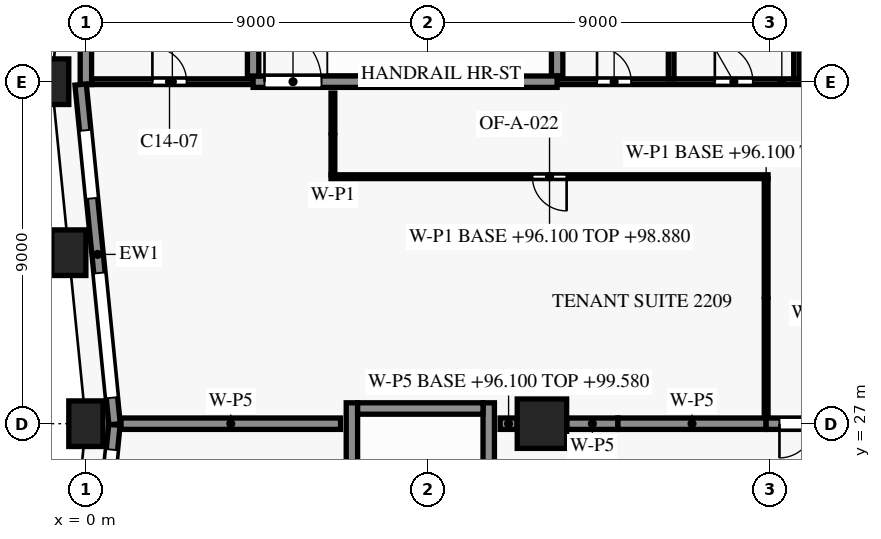
"""IFC4 building model, lengths in metres.
Left out: names, types, materials, properties, quantities, classifications, styles, units other than length and angle.
Written with IfcOpenShell. Run it as: python <this file> out.ifc"""

import sys

from ifc_helpers import new_model, si_unit, direction, frame, frame_2d, origin, origin_2d, place, context, subcontext, project, spatial, rectangle, extrude, element, fill, save


model = new_model("IFC4")
c1 = context("Model", 3, precision=1e-05, world=origin(), true_north=direction((0.0, 1.0)))
c2 = subcontext(c1, "Body", "Model", "MODEL_VIEW")
j1 = project(units=[si_unit("LENGTHUNIT", "METRE"), si_unit("PLANEANGLEUNIT", "RADIAN")], contexts=[c1])
p1 = place(None, origin())
s1 = spatial("IfcSite", under=j1, at=p1, CompositionType="ELEMENT")
p2 = place(p1, origin())
s2 = spatial("IfcBuilding", under=s1, at=p2, CompositionType="ELEMENT")
p3 = place(p2, frame((0.0, 0.0, 96.1)))
s3 = spatial("IfcBuildingStorey", under=s2, at=p3, CompositionType="ELEMENT", Elevation=96.1)
for number, where, z_axis, x_axis in (
    (1, (-0.9, 36.0, 0.0), (0.0, 0.0, 1.0), (0.0, -1.0, 0.0)),
    (2, (-0.45, 31.5, 0.0), (0.0, 0.0, 1.0), (0.1, -0.995, 0.0)),
    (3, (0.0, 27.0, 0.0), (0.0, 0.0, 1.0), (0.0, -1.0, 0.0)),
):
    element("IfcColumn", number, at=place(p3, frame(where, z_axis=z_axis, x_axis=x_axis)), inside=s3, PredefinedType="COLUMN", context=c2, shape_type="SweptSolid", body=[
        extrude(rectangle(XDim=0.9, YDim=1.2, at=origin_2d()), origin(), (0.0, 0.0, 1.0), 3.8),
    ])
p4 = place(p3, frame((12.0, 27.0, 0.0), z_axis=(0.0, 0.0, 1.0), x_axis=(1.0, 0.0, 0.0)))
e4 = element("IfcColumn", 4, at=p4, inside=s3, PredefinedType="COLUMN", context=c2, shape_type="SweptSolid", body=[
    extrude(rectangle(XDim=1.3, YDim=1.3, at=origin_2d()), origin(), (0.0, 0.0, 1.0), 3.8),
])
p5 = place(p3, frame((0.755, 26.985, 0.0), z_axis=(0.0, 0.0, 1.0), x_axis=(-0.099479505633, 0.995039611251, 0.0)))
e5 = element("IfcWall", 5, at=p5, inside=s3, PredefinedType="SOLIDWALL", context=c2, shape_type="SweptSolid", body=[
    extrude(rectangle(XDim=8.985, YDim=0.3, at=frame_2d((4.492, 0.0))), origin(), (0.0, 0.0, 1.0), 3.15),
])
p6 = place(p5, frame((0.701, 0.0, 0.15)))
e6 = element("IfcOpeningElement", 6, at=p6, cuts=e5, PredefinedType="OPENING", context=c2, shape_type="SweptSolid", body=[
    extrude(rectangle(XDim=3.3, YDim=2.4, at=frame_2d((1.65, 1.2))), frame((0.0, 0.16, 0.0), z_axis=(0.0, -1.0, 0.0), x_axis=(1.0, 0.0, 0.0)), (0.0, 0.0, 1.0), 0.32),
])
p7 = place(p5, frame((5.974, 0.0, 0.75)))
e7 = element("IfcOpeningElement", 7, at=p7, cuts=e5, PredefinedType="OPENING", context=c2, shape_type="SweptSolid", body=[
    extrude(rectangle(XDim=1.8, YDim=1.8, at=frame_2d((0.9, 0.9))), frame((0.0, 0.16, 0.0), z_axis=(0.0, -1.0, 0.0), x_axis=(1.0, 0.0, 0.0)), (0.0, 0.0, 1.0), 0.32),
])
p8 = place(p3, frame((-0.148, 17.985, 0.0), z_axis=(0.0, 0.0, 1.0), x_axis=(0.099495688264, 0.995037993253, 0.0)))
e8 = element("IfcWall", 8, at=p8, inside=s3, PredefinedType="SOLIDWALL", context=c2, shape_type="SweptSolid", body=[
    extrude(rectangle(XDim=9.03, YDim=0.3, at=frame_2d((4.515, 0.0))), origin(), (0.0, 0.0, 1.0), 3.15),
])
p9 = place(p8, frame((1.301, 0.0, 0.75)))
e9 = element("IfcOpeningElement", 9, at=p9, cuts=e8, PredefinedType="OPENING", context=c2, shape_type="SweptSolid", body=[
    extrude(rectangle(XDim=1.8, YDim=1.8, at=frame_2d((0.9, 0.9))), frame((0.0, 0.16, 0.0), z_axis=(0.0, -1.0, 0.0), x_axis=(1.0, 0.0, 0.0)), (0.0, 0.0, 1.0), 0.32),
])
p10 = place(p8, frame((5.073, 0.0, 0.15)))
e10 = element("IfcOpeningElement", 10, at=p10, cuts=e8, PredefinedType="OPENING", context=c2, shape_type="SweptSolid", body=[
    extrude(rectangle(XDim=3.3, YDim=2.4, at=frame_2d((1.65, 1.2))), frame((0.0, 0.16, 0.0), z_axis=(0.0, -1.0, 0.0), x_axis=(1.0, 0.0, 0.0)), (0.0, 0.0, 1.0), 0.32),
])
p11 = place(p3, frame((7.15, 27.4, 0.0), z_axis=(0.0, 0.0, 1.0), x_axis=(1.0, 0.0, 0.0)))
e11 = element("IfcWall", 11, at=p11, inside=s3, PredefinedType="SHEAR", context=c2, shape_type="SweptSolid", body=[
    extrude(rectangle(XDim=3.3, YDim=0.3, at=frame_2d((1.65, 0.0))), origin(), (0.0, 0.0, 1.0), 3.5),
])
p12 = place(p3, frame((0.15, 36.0, 0.0), z_axis=(0.0, 0.0, 1.0), x_axis=(1.0, 0.0, 0.0)))
e12 = element("IfcWall", 12, at=p12, inside=s3, PredefinedType="PARTITIONING", context=c2, shape_type="SweptSolid", body=[
    extrude(rectangle(XDim=4.25, YDim=0.15, at=frame_2d((2.125, 0.0))), origin(), (0.0, 0.0, 1.0), 3.5),
])
p13 = place(p12, frame((1.6, 0.0, 0.0)))
e13 = element("IfcOpeningElement", 13, at=p13, cuts=e12, PredefinedType="OPENING", context=c2, shape_type="SweptSolid", body=[
    extrude(rectangle(XDim=0.9, YDim=2.1, at=frame_2d((0.45, 1.05))), frame((0.0, 0.085, 0.0), z_axis=(0.0, -1.0, 0.0), x_axis=(1.0, 0.0, 0.0)), (0.0, 0.0, 1.0), 0.17),
])
p14 = place(p3, frame((12.4, 36.0, 0.0), z_axis=(0.0, 0.0, 1.0), x_axis=(1.0, 0.0, 0.0)))
e14 = element("IfcWall", 14, at=p14, inside=s3, PredefinedType="SHEAR", context=c2, shape_type="SweptSolid", body=[
    extrude(rectangle(XDim=11.825, YDim=0.15, at=frame_2d((5.913, 0.0))), origin(), (0.0, 0.0, 1.0), 3.5),
])
p15 = place(p14, frame((1.05, 0.0, 0.0)))
e15 = element("IfcOpeningElement", 15, at=p15, cuts=e14, PredefinedType="OPENING", context=c2, shape_type="SweptSolid", body=[
    extrude(rectangle(XDim=0.9, YDim=2.1, at=frame_2d((0.45, 1.05))), frame((0.0, 0.085, 0.0), z_axis=(0.0, -1.0, 0.0), x_axis=(1.0, 0.0, 0.0)), (0.0, 0.0, 1.0), 0.17),
])
p16 = place(p14, frame((4.15, 0.0, 0.0)))
e16 = element("IfcOpeningElement", 16, at=p16, cuts=e14, PredefinedType="OPENING", context=c2, shape_type="SweptSolid", body=[
    extrude(rectangle(XDim=1.0, YDim=2.1, at=frame_2d((0.5, 1.05))), frame((0.0, 0.085, 0.0), z_axis=(0.0, -1.0, 0.0), x_axis=(1.0, 0.0, 0.0)), (0.0, 0.0, 1.0), 0.17),
])
p17 = place(p14, frame((7.35, 0.0, 0.0)))
e17 = element("IfcOpeningElement", 17, at=p17, cuts=e14, PredefinedType="OPENING", context=c2, shape_type="SweptSolid", body=[
    extrude(rectangle(XDim=0.9, YDim=2.1, at=frame_2d((0.45, 1.05))), frame((0.0, 0.085, 0.0), z_axis=(0.0, -1.0, 0.0), x_axis=(1.0, 0.0, 0.0)), (0.0, 0.0, 1.0), 0.17),
])
p18 = place(p14, frame((10.125, 0.0, 0.0)))
e18 = element("IfcOpeningElement", 18, at=p18, cuts=e14, PredefinedType="OPENING", context=c2, shape_type="SweptSolid", body=[
    extrude(rectangle(XDim=0.95, YDim=2.1, at=frame_2d((0.475, 1.05))), frame((0.0, 0.085, 0.0), z_axis=(0.0, -1.0, 0.0), x_axis=(1.0, 0.0, 0.0)), (0.0, 0.0, 1.0), 0.17),
])
p19 = place(p3, frame((4.4, 36.0, 0.0), z_axis=(0.0, 0.0, 1.0), x_axis=(1.0, 0.0, 0.0)))
e19 = element("IfcWall", 19, at=p19, inside=s3, PredefinedType="SHEAR", context=c2, shape_type="SweptSolid", body=[
    extrude(rectangle(XDim=8.0, YDim=0.3, at=frame_2d((4.0, 0.0))), origin(), (0.0, 0.0, 1.0), 3.5),
])
p20 = place(p19, frame((0.3, 0.0, 0.0)))
e20 = element("IfcOpeningElement", 20, at=p20, cuts=e19, PredefinedType="OPENING", context=c2, shape_type="SweptSolid", body=[
    extrude(rectangle(XDim=1.5, YDim=2.2, at=frame_2d((0.75, 1.1))), frame((0.0, 0.16, 0.0), z_axis=(0.0, -1.0, 0.0), x_axis=(1.0, 0.0, 0.0)), (0.0, 0.0, 1.0), 0.32),
])
p21 = place(p3, frame((0.0, 35.925, 0.0), z_axis=(0.0, 0.0, 1.0), x_axis=(0.0, 1.0, 0.0)))
e21 = element("IfcWall", 21, at=p21, inside=s3, PredefinedType="SHEAR", context=c2, shape_type="SweptSolid", body=[
    extrude(rectangle(XDim=7.35, YDim=0.3, at=frame_2d((3.675, 0.0))), origin(), (0.0, 0.0, 1.0), 3.5),
])
p22 = place(p3, frame((4.4, 36.15, 0.0), z_axis=(0.0, 0.0, 1.0), x_axis=(0.0, 1.0, 0.0)))
e22 = element("IfcWall", 22, at=p22, inside=s3, PredefinedType="SHEAR", context=c2, shape_type="SweptSolid", body=[
    extrude(rectangle(XDim=3.45, YDim=0.3, at=frame_2d((1.725, 0.0))), origin(), (0.0, 0.0, 1.0), 3.5),
])
p23 = place(p3, frame((7.0, 19.25, 0.0), z_axis=(0.0, 0.0, 1.0), x_axis=(0.0, 1.0, 0.0)))
e23 = element("IfcWall", 23, at=p23, inside=s3, PredefinedType="SHEAR", context=c2, shape_type="SweptSolid", body=[
    extrude(rectangle(XDim=8.3, YDim=0.3, at=frame_2d((4.15, 0.0))), origin(), (0.0, 0.0, 1.0), 3.5),
])
p24 = place(p3, frame((10.6, 19.25, 0.0), z_axis=(0.0, 0.0, 1.0), x_axis=(0.0, 1.0, 0.0)))
e24 = element("IfcWall", 24, at=p24, inside=s3, PredefinedType="SHEAR", context=c2, shape_type="SweptSolid", body=[
    extrude(rectangle(XDim=8.3, YDim=0.3, at=frame_2d((4.15, 0.0))), origin(), (0.0, 0.0, 1.0), 3.5),
])
p25 = place(p24, frame((0.55, 0.0, 0.0)))
e25 = element("IfcOpeningElement", 25, at=p25, cuts=e24, PredefinedType="OPENING", context=c2, shape_type="SweptSolid", body=[
    extrude(rectangle(XDim=1.2, YDim=2.2, at=frame_2d((0.6, 1.1))), frame((0.0, 0.16, 0.0), z_axis=(0.0, -1.0, 0.0), x_axis=(1.0, 0.0, 0.0)), (0.0, 0.0, 1.0), 0.32),
])
p26 = place(p3, frame((12.4, 36.15, 0.0), z_axis=(0.0, 0.0, 1.0), x_axis=(0.0, 1.0, 0.0)))
e26 = element("IfcWall", 26, at=p26, inside=s3, PredefinedType="SHEAR", context=c2, shape_type="SweptSolid", body=[
    extrude(rectangle(XDim=3.725, YDim=0.3, at=frame_2d((1.863, 0.0))), origin(), (0.0, 0.0, 1.0), 3.5),
])
for number, where, z_axis, x_axis in (
    (27, (15.4, 36.075, 0.0), (0.0, 0.0, 1.0), (0.0, 1.0, 0.0)),
    (28, (18.7, 36.075, 0.0), (0.0, 0.0, 1.0), (0.0, 1.0, 0.0)),
):
    element("IfcWall", number, at=place(p3, frame(where, z_axis=z_axis, x_axis=x_axis)), inside=s3, PredefinedType="PARTITIONING", context=c2, shape_type="SweptSolid", body=[
        extrude(rectangle(XDim=3.8, YDim=0.15, at=frame_2d((1.9, 0.0))), origin(), (0.0, 0.0, 1.0), 3.5),
    ])
p27 = place(p3, frame((0.925, 27.0, 0.0), z_axis=(0.0, 0.0, 1.0), x_axis=(1.0, 0.0, 0.0)))
e29 = element("IfcWall", 29, at=p27, inside=s3, PredefinedType="PARTITIONING", context=c2, shape_type="SweptSolid", body=[
    extrude(rectangle(XDim=5.775, YDim=0.3, at=frame_2d((2.888, 0.0))), origin(), (0.0, 0.0, 1.0), 2.78),
])
p28 = place(p3, frame((10.9, 27.0, 0.0), z_axis=(0.0, 0.0, 1.0), x_axis=(1.0, 0.0, 0.0)))
e30 = element("IfcWall", 30, at=p28, inside=s3, PredefinedType="PARTITIONING", context=c2, shape_type="SweptSolid", body=[
    extrude(rectangle(XDim=0.445, YDim=0.3, at=frame_2d((0.223, 0.0))), origin(), (0.0, 0.0, 1.0), 3.48),
])
p29 = place(p3, frame((12.655, 27.0, 0.0), z_axis=(0.0, 0.0, 1.0), x_axis=(1.0, 0.0, 0.0)))
e31 = element("IfcWall", 31, at=p29, inside=s3, PredefinedType="PARTITIONING", context=c2, shape_type="SweptSolid", body=[
    extrude(rectangle(XDim=1.345, YDim=0.3, at=frame_2d((0.672, 0.0))), origin(), (0.0, 0.0, 1.0), 2.78),
])
p30 = place(p3, frame((14.0, 27.0, 0.0), z_axis=(0.0, 0.0, 1.0), x_axis=(1.0, 0.0, 0.0)))
e32 = element("IfcWall", 32, at=p30, inside=s3, PredefinedType="PARTITIONING", context=c2, shape_type="SweptSolid", body=[
    extrude(rectangle(XDim=3.9, YDim=0.3, at=frame_2d((1.95, 0.0))), origin(), (0.0, 0.0, 1.0), 2.78),
])
p31 = place(p3, frame((20.4, 27.0, 0.0), z_axis=(0.0, 0.0, 1.0), x_axis=(-1.0, 0.0, 0.0)))
e33 = element("IfcWall", 33, at=p31, inside=s3, PredefinedType="PARTITIONING", context=c2, shape_type="SweptSolid", body=[
    extrude(rectangle(XDim=2.5, YDim=0.3, at=frame_2d((1.25, 0.0))), origin(), (0.0, 0.0, 1.0), 2.78),
])
p32 = place(p31, frame((0.35, 0.0, 0.0)))
e34 = element("IfcOpeningElement", 34, at=p32, cuts=e33, PredefinedType="OPENING", context=c2, shape_type="SweptSolid", body=[
    extrude(rectangle(XDim=1.8, YDim=2.1, at=frame_2d((0.9, 1.05))), frame((0.0, 0.16, 0.0), z_axis=(0.0, -1.0, 0.0), x_axis=(1.0, 0.0, 0.0)), (0.0, 0.0, 1.0), 0.32),
])
p33 = place(p3, frame((17.9, 27.17, 0.0), z_axis=(0.0, 0.0, 1.0), x_axis=(0.0, 1.0, 0.0)))
e35 = element("IfcWall", 35, at=p33, inside=s3, PredefinedType="PARTITIONING", context=c2, shape_type="SweptSolid", body=[
    extrude(rectangle(XDim=6.28, YDim=0.1, at=frame_2d((3.14, 0.0))), origin(), (0.0, 0.0, 1.0), 2.78),
])
p34 = place(p3, frame((17.95, 33.5, 0.0), z_axis=(0.0, 0.0, 1.0), x_axis=(-1.0, 0.0, 0.0)))
e36 = element("IfcWall", 36, at=p34, inside=s3, PredefinedType="PARTITIONING", context=c2, shape_type="SweptSolid", body=[
    extrude(rectangle(XDim=11.5, YDim=0.1, at=frame_2d((5.75, 0.0))), origin(), (0.0, 0.0, 1.0), 2.78),
])
p35 = place(p34, frame((5.3, 0.0, 0.0)))
e37 = element("IfcOpeningElement", 37, at=p35, cuts=e36, PredefinedType="OPENING", context=c2, shape_type="SweptSolid", body=[
    extrude(rectangle(XDim=0.9, YDim=2.1, at=frame_2d((0.45, 1.05))), frame((0.0, 0.06, 0.0), z_axis=(0.0, -1.0, 0.0), x_axis=(1.0, 0.0, 0.0)), (0.0, 0.0, 1.0), 0.12),
])
p36 = place(p3, frame((6.5, 33.55, 0.0), z_axis=(0.0, 0.0, 1.0), x_axis=(0.0, 1.0, 0.0)))
e38 = element("IfcWall", 38, at=p36, inside=s3, PredefinedType="PARTITIONING", context=c2, shape_type="SweptSolid", body=[
    extrude(rectangle(XDim=2.15, YDim=0.1, at=frame_2d((1.075, 0.0))), origin(), (0.0, 0.0, 1.0), 3.48),
])
p37 = place(p6, origin())
e39 = element("IfcWindow", 39, at=p37, inside=s3, PartitioningType="SINGLE_PANEL", PredefinedType="WINDOW", context=c2, shape_type="SweptSolid", body=[
    extrude(rectangle(XDim=3.3, YDim=2.4, at=frame_2d((1.65, 1.2))), frame((0.0, 0.03, 0.0), z_axis=(0.0, -1.0, 0.0), x_axis=(1.0, 0.0, 0.0)), (0.0, 0.0, 1.0), 0.06),
])
fill(e6, e39)
p38 = place(p7, origin())
e40 = element("IfcWindow", 40, at=p38, inside=s3, PartitioningType="SINGLE_PANEL", PredefinedType="WINDOW", context=c2, shape_type="SweptSolid", body=[
    extrude(rectangle(XDim=1.8, YDim=1.8, at=frame_2d((0.9, 0.9))), frame((0.0, 0.03, 0.0), z_axis=(0.0, -1.0, 0.0), x_axis=(1.0, 0.0, 0.0)), (0.0, 0.0, 1.0), 0.06),
])
fill(e7, e40)
p39 = place(p10, origin())
e41 = element("IfcWindow", 41, at=p39, inside=s3, PartitioningType="SINGLE_PANEL", PredefinedType="WINDOW", context=c2, shape_type="SweptSolid", body=[
    extrude(rectangle(XDim=3.3, YDim=2.4, at=frame_2d((1.65, 1.2))), frame((0.0, 0.03, 0.0), z_axis=(0.0, -1.0, 0.0), x_axis=(1.0, 0.0, 0.0)), (0.0, 0.0, 1.0), 0.06),
])
fill(e10, e41)
p40 = place(p15, origin())
e42 = element("IfcDoor", 42, at=p40, inside=s3, OperationType="SINGLE_SWING_RIGHT", PredefinedType="DOOR", context=c2, shape_type="SweptSolid", body=[
    extrude(rectangle(XDim=0.9, YDim=2.1, at=frame_2d((0.45, 1.05))), frame((0.0, 0.025, 0.0), z_axis=(0.0, -1.0, 0.0), x_axis=(1.0, 0.0, 0.0)), (0.0, 0.0, 1.0), 0.05),
])
fill(e15, e42)
p41 = place(p16, origin())
e43 = element("IfcDoor", 43, at=p41, inside=s3, OperationType="SINGLE_SWING_LEFT", PredefinedType="DOOR", context=c2, shape_type="SweptSolid", body=[
    extrude(rectangle(XDim=1.0, YDim=2.1, at=frame_2d((0.5, 1.05))), frame((0.0, 0.025, 0.0), z_axis=(0.0, -1.0, 0.0), x_axis=(1.0, 0.0, 0.0)), (0.0, 0.0, 1.0), 0.05),
])
fill(e16, e43)
p42 = place(p13, origin())
e44 = element("IfcDoor", 44, at=p42, inside=s3, OperationType="SINGLE_SWING_LEFT", PredefinedType="DOOR", context=c2, shape_type="SweptSolid", body=[
    extrude(rectangle(XDim=0.9, YDim=2.1, at=frame_2d((0.45, 1.05))), frame((0.0, 0.025, 0.0), z_axis=(0.0, -1.0, 0.0), x_axis=(1.0, 0.0, 0.0)), (0.0, 0.0, 1.0), 0.05),
])
fill(e13, e44)
p43 = place(p20, origin())
e45 = element("IfcDoor", 45, at=p43, inside=s3, OperationType="SINGLE_SWING_RIGHT", PredefinedType="DOOR", context=c2, shape_type="SweptSolid", body=[
    extrude(rectangle(XDim=1.5, YDim=2.2, at=frame_2d((0.75, 1.1))), frame((0.0, 0.025, 0.0), z_axis=(0.0, -1.0, 0.0), x_axis=(1.0, 0.0, 0.0)), (0.0, 0.0, 1.0), 0.05),
])
fill(e20, e45)
p44 = place(p35, origin())
e46 = element("IfcDoor", 46, at=p44, inside=s3, OperationType="SINGLE_SWING_LEFT", PredefinedType="DOOR", context=c2, shape_type="SweptSolid", body=[
    extrude(rectangle(XDim=0.9, YDim=2.1, at=frame_2d((0.45, 1.05))), frame((0.0, 0.025, 0.0), z_axis=(0.0, -1.0, 0.0), x_axis=(1.0, 0.0, 0.0)), (0.0, 0.0, 1.0), 0.05),
])
fill(e37, e46)
p45 = place(p32, origin())
e47 = element("IfcDoor", 47, at=p45, inside=s3, OperationType="DOUBLE_DOOR_SINGLE_SWING", PredefinedType="DOOR", context=c2, shape_type="SweptSolid", body=[
    extrude(rectangle(XDim=1.8, YDim=2.1, at=frame_2d((0.9, 1.05))), frame((0.0, 0.025, 0.0), z_axis=(0.0, -1.0, 0.0), x_axis=(1.0, 0.0, 0.0)), (0.0, 0.0, 1.0), 0.05),
])
fill(e34, e47)
save(model, sys.argv[1])
